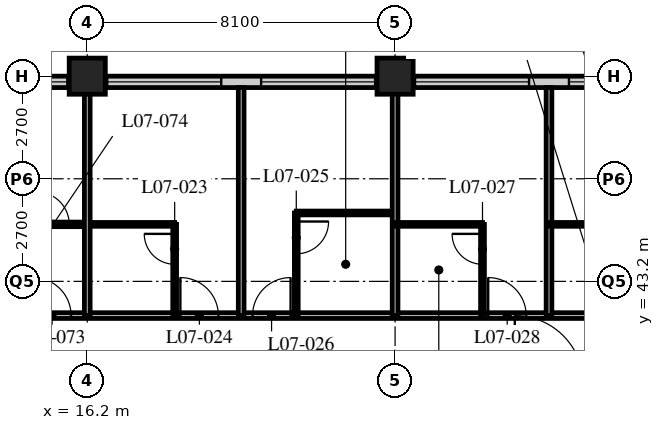
"""IFC4 building model, lengths in metres.
Left out: names, types, materials, properties, quantities, classifications, styles, units other than length and angle.
Written with IfcOpenShell. Run it as: python <this file> out.ifc"""

import sys

from ifc_helpers import new_model, si_unit, direction, frame, frame_2d, origin, origin_2d, place, context, subcontext, project, spatial, rectangle, hollow_rectangle, extrude, element, fill, save


model = new_model("IFC4")
c1 = context("Model", 3, precision=1e-05, world=origin(), true_north=direction((0.0, 1.0)))
c2 = subcontext(c1, "Body", "Model", "MODEL_VIEW")
j1 = project(units=[si_unit("LENGTHUNIT", "METRE"), si_unit("PLANEANGLEUNIT", "RADIAN")], contexts=[c1])
p1 = place(None, origin())
s1 = spatial("IfcSite", under=j1, at=p1, CompositionType="ELEMENT")
p2 = place(p1, origin())
s2 = spatial("IfcBuilding", under=s1, at=p2, CompositionType="ELEMENT")
p3 = place(p2, frame((0.0, 0.0, 36.4)))
s3 = spatial("IfcBuildingStorey", under=s2, at=p3, CompositionType="ELEMENT", Elevation=36.4)
for number, where, z_axis, x_axis in (
    (1, (16.2, 48.6, 0.0), (0.0, 0.0, 1.0), (1.0, 0.0, 0.0)),
    (2, (24.3, 48.6, 0.0), (0.0, 0.0, 1.0), (1.0, 0.0, 0.0)),
):
    element("IfcColumn", number, at=place(p3, frame(where, z_axis=z_axis, x_axis=x_axis)), inside=s3, PredefinedType="COLUMN", context=c2, shape_type="SweptSolid", body=[
        extrude(hollow_rectangle(XDim=0.95, YDim=0.95, WallThickness=0.095, at=origin_2d()), origin(), (0.0, 0.0, 1.0), 3.4),
    ])
p4 = place(p3, frame((48.3, 48.45, 0.0), z_axis=(0.0, 0.0, 1.0), x_axis=(-1.0, 0.0, 0.0)))
e3 = element("IfcWall", 3, at=p4, inside=s3, PredefinedType="SOLIDWALL", context=c2, shape_type="SweptSolid", body=[
    extrude(rectangle(XDim=40.2, YDim=0.3, at=frame_2d((20.1, 0.0))), origin(), (0.0, 0.0, 1.0), 3.19),
])
p5 = place(p4, frame((0.225, 0.0, 0.9)))
e4 = element("IfcOpeningElement", 4, at=p5, cuts=e3, PredefinedType="OPENING", context=c2, shape_type="SweptSolid", body=[
    extrude(rectangle(XDim=3.0, YDim=2.0, at=frame_2d((1.5, 1.0))), frame((0.0, 0.16, 0.0), z_axis=(0.0, -1.0, 0.0), x_axis=(1.0, 0.0, 0.0)), (0.0, 0.0, 1.0), 0.32),
])
p6 = place(p4, frame((4.275, 0.0, 0.9)))
e5 = element("IfcOpeningElement", 5, at=p6, cuts=e3, PredefinedType="OPENING", context=c2, shape_type="SweptSolid", body=[
    extrude(rectangle(XDim=3.0, YDim=2.0, at=frame_2d((1.5, 1.0))), frame((0.0, 0.16, 0.0), z_axis=(0.0, -1.0, 0.0), x_axis=(1.0, 0.0, 0.0)), (0.0, 0.0, 1.0), 0.32),
])
p7 = place(p4, frame((8.325, 0.0, 0.9)))
e6 = element("IfcOpeningElement", 6, at=p7, cuts=e3, PredefinedType="OPENING", context=c2, shape_type="SweptSolid", body=[
    extrude(rectangle(XDim=3.0, YDim=2.0, at=frame_2d((1.5, 1.0))), frame((0.0, 0.16, 0.0), z_axis=(0.0, -1.0, 0.0), x_axis=(1.0, 0.0, 0.0)), (0.0, 0.0, 1.0), 0.32),
])
p8 = place(p4, frame((12.375, 0.0, 0.9)))
e7 = element("IfcOpeningElement", 7, at=p8, cuts=e3, PredefinedType="OPENING", context=c2, shape_type="SweptSolid", body=[
    extrude(rectangle(XDim=3.0, YDim=2.0, at=frame_2d((1.5, 1.0))), frame((0.0, 0.16, 0.0), z_axis=(0.0, -1.0, 0.0), x_axis=(1.0, 0.0, 0.0)), (0.0, 0.0, 1.0), 0.32),
])
p9 = place(p4, frame((16.425, 0.0, 0.9)))
e8 = element("IfcOpeningElement", 8, at=p9, cuts=e3, PredefinedType="OPENING", context=c2, shape_type="SweptSolid", body=[
    extrude(rectangle(XDim=3.0, YDim=2.0, at=frame_2d((1.5, 1.0))), frame((0.0, 0.16, 0.0), z_axis=(0.0, -1.0, 0.0), x_axis=(1.0, 0.0, 0.0)), (0.0, 0.0, 1.0), 0.32),
])
p10 = place(p4, frame((20.475, 0.0, 0.9)))
e9 = element("IfcOpeningElement", 9, at=p10, cuts=e3, PredefinedType="OPENING", context=c2, shape_type="SweptSolid", body=[
    extrude(rectangle(XDim=3.0, YDim=2.0, at=frame_2d((1.5, 1.0))), frame((0.0, 0.16, 0.0), z_axis=(0.0, -1.0, 0.0), x_axis=(1.0, 0.0, 0.0)), (0.0, 0.0, 1.0), 0.32),
])
p11 = place(p4, frame((24.525, 0.0, 0.9)))
e10 = element("IfcOpeningElement", 10, at=p11, cuts=e3, PredefinedType="OPENING", context=c2, shape_type="SweptSolid", body=[
    extrude(rectangle(XDim=3.0, YDim=2.0, at=frame_2d((1.5, 1.0))), frame((0.0, 0.16, 0.0), z_axis=(0.0, -1.0, 0.0), x_axis=(1.0, 0.0, 0.0)), (0.0, 0.0, 1.0), 0.32),
])
p12 = place(p4, frame((28.575, 0.0, 0.9)))
e11 = element("IfcOpeningElement", 11, at=p12, cuts=e3, PredefinedType="OPENING", context=c2, shape_type="SweptSolid", body=[
    extrude(rectangle(XDim=3.0, YDim=2.0, at=frame_2d((1.5, 1.0))), frame((0.0, 0.16, 0.0), z_axis=(0.0, -1.0, 0.0), x_axis=(1.0, 0.0, 0.0)), (0.0, 0.0, 1.0), 0.32),
])
p13 = place(p4, frame((32.625, 0.0, 0.9)))
e12 = element("IfcOpeningElement", 12, at=p13, cuts=e3, PredefinedType="OPENING", context=c2, shape_type="SweptSolid", body=[
    extrude(rectangle(XDim=3.0, YDim=2.0, at=frame_2d((1.5, 1.0))), frame((0.0, 0.16, 0.0), z_axis=(0.0, -1.0, 0.0), x_axis=(1.0, 0.0, 0.0)), (0.0, 0.0, 1.0), 0.32),
])
p14 = place(p4, frame((36.675, 0.0, 0.9)))
e13 = element("IfcOpeningElement", 13, at=p14, cuts=e3, PredefinedType="OPENING", context=c2, shape_type="SweptSolid", body=[
    extrude(rectangle(XDim=3.0, YDim=2.0, at=frame_2d((1.5, 1.0))), frame((0.0, 0.16, 0.0), z_axis=(0.0, -1.0, 0.0), x_axis=(1.0, 0.0, 0.0)), (0.0, 0.0, 1.0), 0.32),
])
p15 = place(p3, frame((12.15, 42.3, 0.0), z_axis=(0.0, 0.0, 1.0), x_axis=(1.0, 0.0, 0.0)))
e14 = element("IfcWall", 14, at=p15, inside=s3, PredefinedType="PARTITIONING", context=c2, shape_type="SweptSolid", body=[
    extrude(rectangle(XDim=32.4, YDim=0.15, at=frame_2d((16.2, 0.0))), origin(), (0.0, 0.0, 1.0), 3.19),
])
p16 = place(p15, frame((6.5, 0.0, 0.0)))
e15 = element("IfcOpeningElement", 15, at=p16, cuts=e14, PredefinedType="OPENING", context=c2, shape_type="SweptSolid", body=[
    extrude(rectangle(XDim=1.0, YDim=2.1, at=frame_2d((0.5, 1.05))), frame((0.0, 0.085, 0.0), z_axis=(0.0, -1.0, 0.0), x_axis=(1.0, 0.0, 0.0)), (0.0, 0.0, 1.0), 0.17),
])
p17 = place(p15, frame((8.4, 0.0, 0.0)))
e16 = element("IfcOpeningElement", 16, at=p17, cuts=e14, PredefinedType="OPENING", context=c2, shape_type="SweptSolid", body=[
    extrude(rectangle(XDim=1.0, YDim=2.1, at=frame_2d((0.5, 1.05))), frame((0.0, 0.085, 0.0), z_axis=(0.0, -1.0, 0.0), x_axis=(1.0, 0.0, 0.0)), (0.0, 0.0, 1.0), 0.17),
])
p18 = place(p15, frame((14.6, 0.0, 0.0)))
e17 = element("IfcOpeningElement", 17, at=p18, cuts=e14, PredefinedType="OPENING", context=c2, shape_type="SweptSolid", body=[
    extrude(rectangle(XDim=1.0, YDim=2.1, at=frame_2d((0.5, 1.05))), frame((0.0, 0.085, 0.0), z_axis=(0.0, -1.0, 0.0), x_axis=(1.0, 0.0, 0.0)), (0.0, 0.0, 1.0), 0.17),
])
p19 = place(p15, frame((18.65, 0.0, 0.0)))
e18 = element("IfcOpeningElement", 18, at=p19, cuts=e14, PredefinedType="OPENING", context=c2, shape_type="SweptSolid", body=[
    extrude(rectangle(XDim=1.0, YDim=2.1, at=frame_2d((0.5, 1.05))), frame((0.0, 0.085, 0.0), z_axis=(0.0, -1.0, 0.0), x_axis=(1.0, 0.0, 0.0)), (0.0, 0.0, 1.0), 0.17),
])
p20 = place(p15, frame((23.0, 0.0, 0.0)))
e19 = element("IfcOpeningElement", 19, at=p20, cuts=e14, PredefinedType="OPENING", context=c2, shape_type="SweptSolid", body=[
    extrude(rectangle(XDim=1.0, YDim=2.1, at=frame_2d((0.5, 1.05))), frame((0.0, 0.085, 0.0), z_axis=(0.0, -1.0, 0.0), x_axis=(1.0, 0.0, 0.0)), (0.0, 0.0, 1.0), 0.17),
])
p21 = place(p15, frame((26.75, 0.0, 0.0)))
e20 = element("IfcOpeningElement", 20, at=p21, cuts=e14, PredefinedType="OPENING", context=c2, shape_type="SweptSolid", body=[
    extrude(rectangle(XDim=1.0, YDim=2.1, at=frame_2d((0.5, 1.05))), frame((0.0, 0.085, 0.0), z_axis=(0.0, -1.0, 0.0), x_axis=(1.0, 0.0, 0.0)), (0.0, 0.0, 1.0), 0.17),
])
p22 = place(p15, frame((28.775, 0.0, 0.0)))
e21 = element("IfcOpeningElement", 21, at=p22, cuts=e14, PredefinedType="OPENING", context=c2, shape_type="SweptSolid", body=[
    extrude(rectangle(XDim=1.0, YDim=2.1, at=frame_2d((0.5, 1.05))), frame((0.0, 0.085, 0.0), z_axis=(0.0, -1.0, 0.0), x_axis=(1.0, 0.0, 0.0)), (0.0, 0.0, 1.0), 0.17),
])
p23 = place(p15, frame((2.625, 0.0, 0.0)))
e22 = element("IfcOpeningElement", 22, at=p23, cuts=e14, PredefinedType="OPENING", context=c2, shape_type="SweptSolid", body=[
    extrude(rectangle(XDim=1.0, YDim=2.1, at=frame_2d((0.5, 1.05))), frame((0.0, 0.085, 0.0), z_axis=(0.0, -1.0, 0.0), x_axis=(1.0, 0.0, 0.0)), (0.0, 0.0, 1.0), 0.17),
])
p24 = place(p3, frame((16.2, 44.7, 0.0), z_axis=(0.0, 0.0, 1.0), x_axis=(1.0, 0.0, 0.0)))
e23 = element("IfcWall", 23, at=p24, inside=s3, PredefinedType="PARTITIONING", context=c2, shape_type="SweptSolid", body=[
    extrude(rectangle(XDim=2.3, YDim=0.1, at=frame_2d((1.15, 0.0))), origin(), (0.0, 0.0, 1.0), 3.19),
])
p25 = place(p3, frame((18.5, 42.3, 0.0), z_axis=(0.0, 0.0, 1.0), x_axis=(0.0, 1.0, 0.0)))
e24 = element("IfcWall", 24, at=p25, inside=s3, PredefinedType="PARTITIONING", context=c2, shape_type="SweptSolid", body=[
    extrude(rectangle(XDim=2.4, YDim=0.1, at=frame_2d((1.2, 0.0))), origin(), (0.0, 0.0, 1.0), 3.19),
])
p26 = place(p25, frame((1.35, 0.0, 0.0)))
e25 = element("IfcOpeningElement", 25, at=p26, cuts=e24, PredefinedType="OPENING", context=c2, shape_type="SweptSolid", body=[
    extrude(rectangle(XDim=0.8, YDim=2.1, at=frame_2d((0.4, 1.05))), frame((0.0, 0.06, 0.0), z_axis=(0.0, -1.0, 0.0), x_axis=(1.0, 0.0, 0.0)), (0.0, 0.0, 1.0), 0.12),
])
p27 = place(p3, frame((20.25, 42.3, 0.0), z_axis=(0.0, 0.0, 1.0), x_axis=(0.0, 1.0, 0.0)))
e26 = element("IfcWall", 26, at=p27, inside=s3, PredefinedType="PARTITIONING", context=c2, shape_type="SweptSolid", body=[
    extrude(rectangle(XDim=6.0, YDim=0.15, at=frame_2d((3.0, 0.0))), origin(), (0.0, 0.0, 1.0), 3.19),
])
p28 = place(p3, frame((21.7, 45.0, 0.0), z_axis=(0.0, 0.0, 1.0), x_axis=(1.0, 0.0, 0.0)))
e27 = element("IfcWall", 27, at=p28, inside=s3, PredefinedType="PARTITIONING", context=c2, shape_type="SweptSolid", body=[
    extrude(rectangle(XDim=2.6, YDim=0.1, at=frame_2d((1.3, 0.0))), origin(), (0.0, 0.0, 1.0), 3.19),
])
p29 = place(p3, frame((21.7, 42.3, 0.0), z_axis=(0.0, 0.0, 1.0), x_axis=(0.0, 1.0, 0.0)))
e28 = element("IfcWall", 28, at=p29, inside=s3, PredefinedType="PARTITIONING", context=c2, shape_type="SweptSolid", body=[
    extrude(rectangle(XDim=2.7, YDim=0.1, at=frame_2d((1.35, 0.0))), origin(), (0.0, 0.0, 1.0), 3.19),
])
p30 = place(p29, frame((1.625, 0.0, 0.0)))
e29 = element("IfcOpeningElement", 29, at=p30, cuts=e28, PredefinedType="OPENING", context=c2, shape_type="SweptSolid", body=[
    extrude(rectangle(XDim=0.85, YDim=2.1, at=frame_2d((0.425, 1.05))), frame((0.0, 0.06, 0.0), z_axis=(0.0, -1.0, 0.0), x_axis=(1.0, 0.0, 0.0)), (0.0, 0.0, 1.0), 0.12),
])
p31 = place(p3, frame((24.3, 42.3, 0.0), z_axis=(0.0, 0.0, 1.0), x_axis=(0.0, 1.0, 0.0)))
e30 = element("IfcWall", 30, at=p31, inside=s3, PredefinedType="PARTITIONING", context=c2, shape_type="SweptSolid", body=[
    extrude(rectangle(XDim=6.0, YDim=0.15, at=frame_2d((3.0, 0.0))), origin(), (0.0, 0.0, 1.0), 2.578),
])
p32 = place(p3, frame((24.3, 44.7, 0.0), z_axis=(0.0, 0.0, 1.0), x_axis=(1.0, 0.0, 0.0)))
e31 = element("IfcWall", 31, at=p32, inside=s3, PredefinedType="PARTITIONING", context=c2, shape_type="SweptSolid", body=[
    extrude(rectangle(XDim=2.3, YDim=0.1, at=frame_2d((1.15, 0.0))), origin(), (0.0, 0.0, 1.0), 3.19),
])
p33 = place(p3, frame((26.6, 42.3, 0.0), z_axis=(0.0, 0.0, 1.0), x_axis=(0.0, 1.0, 0.0)))
e32 = element("IfcWall", 32, at=p33, inside=s3, PredefinedType="PARTITIONING", context=c2, shape_type="SweptSolid", body=[
    extrude(rectangle(XDim=2.4, YDim=0.1, at=frame_2d((1.2, 0.0))), origin(), (0.0, 0.0, 1.0), 3.19),
])
p34 = place(p33, frame((1.35, 0.0, 0.0)))
e33 = element("IfcOpeningElement", 33, at=p34, cuts=e32, PredefinedType="OPENING", context=c2, shape_type="SweptSolid", body=[
    extrude(rectangle(XDim=0.8, YDim=2.1, at=frame_2d((0.4, 1.05))), frame((0.0, 0.06, 0.0), z_axis=(0.0, -1.0, 0.0), x_axis=(1.0, 0.0, 0.0)), (0.0, 0.0, 1.0), 0.12),
])
p35 = place(p3, frame((28.35, 42.3, 0.0), z_axis=(0.0, 0.0, 1.0), x_axis=(0.0, 1.0, 0.0)))
e34 = element("IfcWall", 34, at=p35, inside=s3, PredefinedType="PARTITIONING", context=c2, shape_type="SweptSolid", body=[
    extrude(rectangle(XDim=6.0, YDim=0.15, at=frame_2d((3.0, 0.0))), origin(), (0.0, 0.0, 1.0), 3.19),
])
p36 = place(p3, frame((28.35, 44.7, 0.0), z_axis=(0.0, 0.0, 1.0), x_axis=(1.0, 0.0, 0.0)))
e35 = element("IfcWall", 35, at=p36, inside=s3, PredefinedType="PARTITIONING", context=c2, shape_type="SweptSolid", body=[
    extrude(rectangle(XDim=2.3, YDim=0.1, at=frame_2d((1.15, 0.0))), origin(), (0.0, 0.0, 1.0), 3.19),
])
p37 = place(p3, frame((12.15, 44.7, 0.0), z_axis=(0.0, 0.0, 1.0), x_axis=(1.0, 0.0, 0.0)))
e36 = element("IfcWall", 36, at=p37, inside=s3, PredefinedType="PARTITIONING", context=c2, shape_type="SweptSolid", body=[
    extrude(rectangle(XDim=4.05, YDim=0.12, at=frame_2d((2.025, 0.0))), origin(), (0.0, 0.0, 1.0), 3.19),
])
p38 = place(p37, frame((2.725, 0.0, 0.0)))
e37 = element("IfcOpeningElement", 37, at=p38, cuts=e36, PredefinedType="OPENING", context=c2, shape_type="SweptSolid", body=[
    extrude(rectangle(XDim=0.85, YDim=2.1, at=frame_2d((0.425, 1.05))), frame((0.0, 0.07, 0.0), z_axis=(0.0, -1.0, 0.0), x_axis=(1.0, 0.0, 0.0)), (0.0, 0.0, 1.0), 0.14),
])
p39 = place(p3, frame((16.2, 42.3, 0.0), z_axis=(0.0, 0.0, 1.0), x_axis=(0.0, 1.0, 0.0)))
e38 = element("IfcWall", 38, at=p39, inside=s3, PredefinedType="PARTITIONING", context=c2, shape_type="SweptSolid", body=[
    extrude(rectangle(XDim=6.0, YDim=0.15, at=frame_2d((3.0, 0.0))), origin(), (0.0, 0.0, 1.0), 2.578),
])
p40 = place(p9, origin())
e39 = element("IfcWindow", 39, at=p40, inside=s3, PartitioningType="SINGLE_PANEL", PredefinedType="WINDOW", context=c2, shape_type="SweptSolid", body=[
    extrude(rectangle(XDim=3.0, YDim=2.0, at=frame_2d((1.5, 1.0))), frame((0.0, 0.03, 0.0), z_axis=(0.0, -1.0, 0.0), x_axis=(1.0, 0.0, 0.0)), (0.0, 0.0, 1.0), 0.06),
])
fill(e8, e39)
p41 = place(p10, origin())
e40 = element("IfcWindow", 40, at=p41, inside=s3, PartitioningType="SINGLE_PANEL", PredefinedType="WINDOW", context=c2, shape_type="SweptSolid", body=[
    extrude(rectangle(XDim=3.0, YDim=2.0, at=frame_2d((1.5, 1.0))), frame((0.0, 0.03, 0.0), z_axis=(0.0, -1.0, 0.0), x_axis=(1.0, 0.0, 0.0)), (0.0, 0.0, 1.0), 0.06),
])
fill(e9, e40)
p42 = place(p11, origin())
e41 = element("IfcWindow", 41, at=p42, inside=s3, PartitioningType="SINGLE_PANEL", PredefinedType="WINDOW", context=c2, shape_type="SweptSolid", body=[
    extrude(rectangle(XDim=3.0, YDim=2.0, at=frame_2d((1.5, 1.0))), frame((0.0, 0.03, 0.0), z_axis=(0.0, -1.0, 0.0), x_axis=(1.0, 0.0, 0.0)), (0.0, 0.0, 1.0), 0.06),
])
fill(e10, e41)
p43 = place(p12, origin())
e42 = element("IfcWindow", 42, at=p43, inside=s3, PartitioningType="SINGLE_PANEL", PredefinedType="WINDOW", context=c2, shape_type="SweptSolid", body=[
    extrude(rectangle(XDim=3.0, YDim=2.0, at=frame_2d((1.5, 1.0))), frame((0.0, 0.03, 0.0), z_axis=(0.0, -1.0, 0.0), x_axis=(1.0, 0.0, 0.0)), (0.0, 0.0, 1.0), 0.06),
])
fill(e11, e42)
p44 = place(p13, origin())
e43 = element("IfcWindow", 43, at=p44, inside=s3, PartitioningType="SINGLE_PANEL", PredefinedType="WINDOW", context=c2, shape_type="SweptSolid", body=[
    extrude(rectangle(XDim=3.0, YDim=2.0, at=frame_2d((1.5, 1.0))), frame((0.0, 0.03, 0.0), z_axis=(0.0, -1.0, 0.0), x_axis=(1.0, 0.0, 0.0)), (0.0, 0.0, 1.0), 0.06),
])
fill(e12, e43)
p45 = place(p26, origin())
e44 = element("IfcDoor", 44, at=p45, inside=s3, OperationType="SINGLE_SWING_RIGHT", PredefinedType="DOOR", context=c2, shape_type="SweptSolid", body=[
    extrude(rectangle(XDim=0.8, YDim=2.1, at=frame_2d((0.4, 1.05))), frame((0.0, 0.025, 0.0), z_axis=(0.0, -1.0, 0.0), x_axis=(1.0, 0.0, 0.0)), (0.0, 0.0, 1.0), 0.05),
])
fill(e25, e44)
p46 = place(p16, origin())
e45 = element("IfcDoor", 45, at=p46, inside=s3, OperationType="SINGLE_SWING_LEFT", PredefinedType="DOOR", context=c2, shape_type="SweptSolid", body=[
    extrude(rectangle(XDim=1.0, YDim=2.1, at=frame_2d((0.5, 1.05))), frame((0.0, 0.025, 0.0), z_axis=(0.0, -1.0, 0.0), x_axis=(1.0, 0.0, 0.0)), (0.0, 0.0, 1.0), 0.05),
])
fill(e15, e45)
p47 = place(p30, origin())
e46 = element("IfcDoor", 46, at=p47, inside=s3, OperationType="SINGLE_SWING_LEFT", PredefinedType="DOOR", context=c2, shape_type="SweptSolid", body=[
    extrude(rectangle(XDim=0.85, YDim=2.1, at=frame_2d((0.425, 1.05))), frame((0.0, 0.025, 0.0), z_axis=(0.0, -1.0, 0.0), x_axis=(1.0, 0.0, 0.0)), (0.0, 0.0, 1.0), 0.05),
])
fill(e29, e46)
p48 = place(p17, origin())
e47 = element("IfcDoor", 47, at=p48, inside=s3, OperationType="SINGLE_SWING_RIGHT", PredefinedType="DOOR", context=c2, shape_type="SweptSolid", body=[
    extrude(rectangle(XDim=1.0, YDim=2.1, at=frame_2d((0.5, 1.05))), frame((0.0, 0.025, 0.0), z_axis=(0.0, -1.0, 0.0), x_axis=(1.0, 0.0, 0.0)), (0.0, 0.0, 1.0), 0.05),
])
fill(e16, e47)
p49 = place(p34, origin())
e48 = element("IfcDoor", 48, at=p49, inside=s3, OperationType="SINGLE_SWING_RIGHT", PredefinedType="DOOR", context=c2, shape_type="SweptSolid", body=[
    extrude(rectangle(XDim=0.8, YDim=2.1, at=frame_2d((0.4, 1.05))), frame((0.0, 0.025, 0.0), z_axis=(0.0, -1.0, 0.0), x_axis=(1.0, 0.0, 0.0)), (0.0, 0.0, 1.0), 0.05),
])
fill(e33, e48)
p50 = place(p18, origin())
e49 = element("IfcDoor", 49, at=p50, inside=s3, OperationType="SINGLE_SWING_LEFT", PredefinedType="DOOR", context=c2, shape_type="SweptSolid", body=[
    extrude(rectangle(XDim=1.0, YDim=2.1, at=frame_2d((0.5, 1.05))), frame((0.0, 0.025, 0.0), z_axis=(0.0, -1.0, 0.0), x_axis=(1.0, 0.0, 0.0)), (0.0, 0.0, 1.0), 0.05),
])
fill(e17, e49)
p51 = place(p23, origin())
e50 = element("IfcDoor", 50, at=p51, inside=s3, OperationType="SINGLE_SWING_LEFT", PredefinedType="DOOR", context=c2, shape_type="SweptSolid", body=[
    extrude(rectangle(XDim=1.0, YDim=2.1, at=frame_2d((0.5, 1.05))), frame((0.0, 0.025, 0.0), z_axis=(0.0, -1.0, 0.0), x_axis=(1.0, 0.0, 0.0)), (0.0, 0.0, 1.0), 0.05),
])
fill(e22, e50)
p52 = place(p38, origin())
e51 = element("IfcDoor", 51, at=p52, inside=s3, OperationType="SINGLE_SWING_LEFT", PredefinedType="DOOR", context=c2, shape_type="SweptSolid", body=[
    extrude(rectangle(XDim=0.85, YDim=2.1, at=frame_2d((0.425, 1.05))), frame((0.0, 0.025, 0.0), z_axis=(0.0, -1.0, 0.0), x_axis=(1.0, 0.0, 0.0)), (0.0, 0.0, 1.0), 0.05),
])
fill(e37, e51)
save(model, sys.argv[1])
